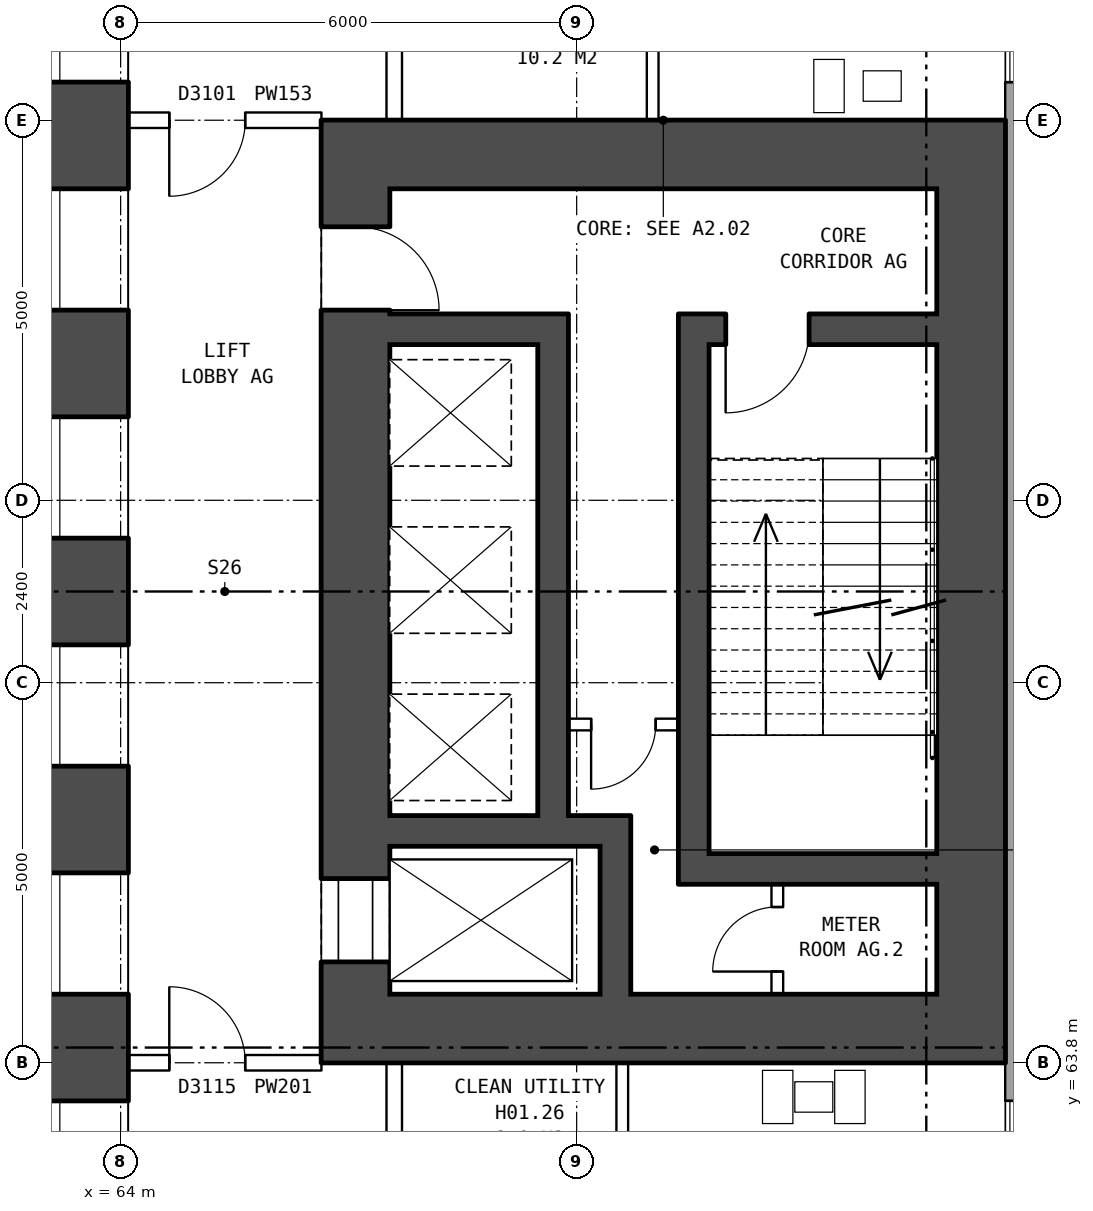
"""IFC4 building model, lengths in metres.
Left out: names, types, materials, properties, quantities, classifications, styles, units other than length and angle.
Written with IfcOpenShell. Run it as: python <this file> out.ifc"""

import sys

from ifc_helpers import new_model, si_unit, direction, frame, frame_2d, origin, place, context, subcontext, project, spatial, rectangle, extrude, element, fill, save


model = new_model("IFC4")
c1 = context("Model", 3, precision=1e-05, world=origin(), true_north=direction((0.0, 1.0)))
c2 = subcontext(c1, "Body", "Model", "MODEL_VIEW")
j1 = project(units=[si_unit("LENGTHUNIT", "METRE"), si_unit("PLANEANGLEUNIT", "RADIAN")], contexts=[c1])
p1 = place(None, origin())
s1 = spatial("IfcSite", under=j1, at=p1, CompositionType="ELEMENT")
p2 = place(p1, origin())
s2 = spatial("IfcBuilding", under=s1, at=p2, CompositionType="ELEMENT")
p3 = place(p2, frame((0.0, 0.0, 5.5)))
s3 = spatial("IfcBuildingStorey", under=s2, at=p3, CompositionType="ELEMENT", Elevation=5.5)
p4 = place(p3, frame((63.5, 56.4, -0.3), z_axis=(0.0, 0.0, 1.0), x_axis=(0.0, 1.0, 0.0)))
e1 = element("IfcWall", 1, at=p4, inside=s3, PredefinedType="SHEAR", context=c2, shape_type="SweptSolid", body=[
    extrude(rectangle(XDim=27.2, YDim=1.2, at=frame_2d((13.6, 0.0))), origin(), (0.0, 0.0, 1.0), 4.6),
])
p5 = place(p4, frame((2.3, 0.0, 0.8)))
e2 = element("IfcOpeningElement", 2, at=p5, cuts=e1, PredefinedType="OPENING", context=c2, shape_type="SweptSolid", body=[
    extrude(rectangle(XDim=1.6, YDim=1.8, at=frame_2d((0.8, 0.9))), frame((0.0, 0.61, 0.0), z_axis=(0.0, -1.0, 0.0), x_axis=(1.0, 0.0, 0.0)), (0.0, 0.0, 1.0), 1.22),
])
p6 = place(p4, frame((5.3, 0.0, 0.8)))
e3 = element("IfcOpeningElement", 3, at=p6, cuts=e1, PredefinedType="OPENING", context=c2, shape_type="SweptSolid", body=[
    extrude(rectangle(XDim=1.6, YDim=1.8, at=frame_2d((0.8, 0.9))), frame((0.0, 0.61, 0.0), z_axis=(0.0, -1.0, 0.0), x_axis=(1.0, 0.0, 0.0)), (0.0, 0.0, 1.0), 1.22),
])
p7 = place(p4, frame((8.3, 0.0, 0.8)))
e4 = element("IfcOpeningElement", 4, at=p7, cuts=e1, PredefinedType="OPENING", context=c2, shape_type="SweptSolid", body=[
    extrude(rectangle(XDim=1.6, YDim=1.8, at=frame_2d((0.8, 0.9))), frame((0.0, 0.61, 0.0), z_axis=(0.0, -1.0, 0.0), x_axis=(1.0, 0.0, 0.0)), (0.0, 0.0, 1.0), 1.22),
])
p8 = place(p4, frame((11.3, 0.0, 0.8)))
e5 = element("IfcOpeningElement", 5, at=p8, cuts=e1, PredefinedType="OPENING", context=c2, shape_type="SweptSolid", body=[
    extrude(rectangle(XDim=1.6, YDim=1.8, at=frame_2d((0.8, 0.9))), frame((0.0, 0.61, 0.0), z_axis=(0.0, -1.0, 0.0), x_axis=(1.0, 0.0, 0.0)), (0.0, 0.0, 1.0), 1.22),
])
p9 = place(p4, frame((14.3, 0.0, 0.8)))
e6 = element("IfcOpeningElement", 6, at=p9, cuts=e1, PredefinedType="OPENING", context=c2, shape_type="SweptSolid", body=[
    extrude(rectangle(XDim=1.6, YDim=1.8, at=frame_2d((0.8, 0.9))), frame((0.0, 0.61, 0.0), z_axis=(0.0, -1.0, 0.0), x_axis=(1.0, 0.0, 0.0)), (0.0, 0.0, 1.0), 1.22),
])
p10 = place(p4, frame((17.3, 0.0, 0.8)))
e7 = element("IfcOpeningElement", 7, at=p10, cuts=e1, PredefinedType="OPENING", context=c2, shape_type="SweptSolid", body=[
    extrude(rectangle(XDim=1.6, YDim=1.8, at=frame_2d((0.8, 0.9))), frame((0.0, 0.61, 0.0), z_axis=(0.0, -1.0, 0.0), x_axis=(1.0, 0.0, 0.0)), (0.0, 0.0, 1.0), 1.22),
])
p11 = place(p4, frame((20.3, 0.0, 0.8)))
e8 = element("IfcOpeningElement", 8, at=p11, cuts=e1, PredefinedType="OPENING", context=c2, shape_type="SweptSolid", body=[
    extrude(rectangle(XDim=1.6, YDim=1.8, at=frame_2d((0.8, 0.9))), frame((0.0, 0.61, 0.0), z_axis=(0.0, -1.0, 0.0), x_axis=(1.0, 0.0, 0.0)), (0.0, 0.0, 1.0), 1.22),
])
p12 = place(p4, frame((23.3, 0.0, 0.8)))
e9 = element("IfcOpeningElement", 9, at=p12, cuts=e1, PredefinedType="OPENING", context=c2, shape_type="SweptSolid", body=[
    extrude(rectangle(XDim=1.6, YDim=1.8, at=frame_2d((0.8, 0.9))), frame((0.0, 0.61, 0.0), z_axis=(0.0, -1.0, 0.0), x_axis=(1.0, 0.0, 0.0)), (0.0, 0.0, 1.0), 1.22),
])
p13 = place(p3, frame((75.82, 57.075, 0.0), z_axis=(0.0, 0.0, 1.0), x_axis=(0.0, 1.0, 0.0)))
e10 = element("IfcWall", 10, at=p13, inside=s3, PredefinedType="STANDARD", context=c2, shape_type="SweptSolid", body=[
    extrude(rectangle(XDim=25.851, YDim=0.36, at=frame_2d((12.925, 0.0))), origin(), (0.0, 0.0, 1.0), 4.3),
])
p14 = place(p13, frame((1.625, 0.0, 0.8)))
e11 = element("IfcOpeningElement", 11, at=p14, cuts=e10, PredefinedType="OPENING", context=c2, shape_type="SweptSolid", body=[
    extrude(rectangle(XDim=1.6, YDim=1.8, at=frame_2d((0.8, 0.9))), frame((0.0, 0.19, 0.0), z_axis=(0.0, -1.0, 0.0), x_axis=(1.0, 0.0, 0.0)), (0.0, 0.0, 1.0), 0.38),
])
p15 = place(p13, frame((4.625, 0.0, 0.8)))
e12 = element("IfcOpeningElement", 12, at=p15, cuts=e10, PredefinedType="OPENING", context=c2, shape_type="SweptSolid", body=[
    extrude(rectangle(XDim=1.6, YDim=1.8, at=frame_2d((0.8, 0.9))), frame((0.0, 0.19, 0.0), z_axis=(0.0, -1.0, 0.0), x_axis=(1.0, 0.0, 0.0)), (0.0, 0.0, 1.0), 0.38),
])
p16 = place(p13, frame((19.625, 0.0, 0.8)))
e13 = element("IfcOpeningElement", 13, at=p16, cuts=e10, PredefinedType="OPENING", context=c2, shape_type="SweptSolid", body=[
    extrude(rectangle(XDim=1.6, YDim=1.8, at=frame_2d((0.8, 0.9))), frame((0.0, 0.19, 0.0), z_axis=(0.0, -1.0, 0.0), x_axis=(1.0, 0.0, 0.0)), (0.0, 0.0, 1.0), 0.38),
])
p17 = place(p13, frame((22.625, 0.0, 0.8)))
e14 = element("IfcOpeningElement", 14, at=p17, cuts=e10, PredefinedType="OPENING", context=c2, shape_type="SweptSolid", body=[
    extrude(rectangle(XDim=1.6, YDim=1.8, at=frame_2d((0.8, 0.9))), frame((0.0, 0.19, 0.0), z_axis=(0.0, -1.0, 0.0), x_axis=(1.0, 0.0, 0.0)), (0.0, 0.0, 1.0), 0.38),
])
p18 = place(p3, frame((67.09, 64.7, 0.0), z_axis=(0.0, 0.0, 1.0), x_axis=(0.0, 1.0, 0.0)))
e15 = element("IfcWall", 15, at=p18, inside=s3, PredefinedType="SHEAR", context=c2, shape_type="SweptSolid", body=[
    extrude(rectangle(XDim=10.6, YDim=0.9, at=frame_2d((5.3, 0.0))), origin(), (0.0, 0.0, 1.0), 4.3),
])
p19 = place(p18, frame((0.425, 0.0, 0.0)))
e16 = element("IfcOpeningElement", 16, at=p19, cuts=e15, PredefinedType="OPENING", context=c2, shape_type="SweptSolid", body=[
    extrude(rectangle(XDim=1.1, YDim=2.1, at=frame_2d((0.55, 1.05))), frame((0.0, 0.46, 0.0), z_axis=(0.0, -1.0, 0.0), x_axis=(1.0, 0.0, 0.0)), (0.0, 0.0, 1.0), 0.92),
])
p20 = place(p18, frame((9.0, 0.0, 0.0)))
e17 = element("IfcOpeningElement", 17, at=p20, cuts=e15, PredefinedType="OPENING", context=c2, shape_type="SweptSolid", body=[
    extrude(rectangle(XDim=1.1, YDim=2.1, at=frame_2d((0.55, 1.05))), frame((0.0, 0.46, 0.0), z_axis=(0.0, -1.0, 0.0), x_axis=(1.0, 0.0, 0.0)), (0.0, 0.0, 1.0), 0.92),
])
p21 = place(p3, frame((75.19, 64.7, 0.0), z_axis=(0.0, 0.0, 1.0), x_axis=(0.0, 1.0, 0.0)))
e18 = element("IfcWall", 18, at=p21, inside=s3, PredefinedType="SHEAR", context=c2, shape_type="SweptSolid", body=[
    extrude(rectangle(XDim=10.6, YDim=0.9, at=frame_2d((5.3, 0.0))), origin(), (0.0, 0.0, 1.0), 4.3),
])
for number, where, z_axis, x_axis in (
    (19, (66.64, 64.25, 0.0), (0.0, 0.0, 1.0), (1.0, 0.0, 0.0)),
    (20, (66.64, 75.75, 0.0), (0.0, 0.0, 1.0), (1.0, 0.0, 0.0)),
):
    element("IfcWall", number, at=place(p3, frame(where, z_axis=z_axis, x_axis=x_axis)), inside=s3, PredefinedType="SHEAR", context=c2, shape_type="SweptSolid", body=[
        extrude(rectangle(XDim=9.0, YDim=0.9, at=frame_2d((4.5, 0.0))), origin(), (0.0, 0.0, 1.0), 4.3),
    ])
p22 = place(p3, frame((71.74, 66.35, 0.0), z_axis=(0.0, 0.0, 1.0), x_axis=(1.0, 0.0, 0.0)))
e21 = element("IfcWall", 21, at=p22, inside=s3, PredefinedType="SHEAR", context=c2, shape_type="SweptSolid", body=[
    extrude(rectangle(XDim=3.0, YDim=0.4, at=frame_2d((1.5, 0.0))), origin(), (0.0, 0.0, 1.0), 4.3),
])
p23 = place(p3, frame((67.54, 66.85, 0.0), z_axis=(0.0, 0.0, 1.0), x_axis=(1.0, 0.0, 0.0)))
e22 = element("IfcWall", 22, at=p23, inside=s3, PredefinedType="SHEAR", context=c2, shape_type="SweptSolid", body=[
    extrude(rectangle(XDim=3.17, YDim=0.4, at=frame_2d((1.585, 0.0))), origin(), (0.0, 0.0, 1.0), 4.3),
])
p24 = place(p3, frame((69.89, 68.25, 0.0), z_axis=(0.0, 0.0, 1.0), x_axis=(1.0, 0.0, 0.0)))
e23 = element("IfcWall", 23, at=p24, inside=s3, PredefinedType="PARTITIONING", context=c2, shape_type="SweptSolid", body=[
    extrude(rectangle(XDim=1.45, YDim=0.15, at=frame_2d((0.725, 0.0))), origin(), (0.0, 0.0, 1.0), 4.3),
])
p25 = place(p24, frame((0.3, 0.0, 0.0)))
e24 = element("IfcOpeningElement", 24, at=p25, cuts=e23, PredefinedType="OPENING", context=c2, shape_type="SweptSolid", body=[
    extrude(rectangle(XDim=0.85, YDim=2.1, at=frame_2d((0.425, 1.05))), frame((0.0, 0.085, 0.0), z_axis=(0.0, -1.0, 0.0), x_axis=(1.0, 0.0, 0.0)), (0.0, 0.0, 1.0), 0.17),
])
p26 = place(p3, frame((67.54, 73.45, 0.0), z_axis=(0.0, 0.0, 1.0), x_axis=(1.0, 0.0, 0.0)))
e25 = element("IfcWall", 25, at=p26, inside=s3, PredefinedType="SHEAR", context=c2, shape_type="SweptSolid", body=[
    extrude(rectangle(XDim=1.95, YDim=0.4, at=frame_2d((0.975, 0.0))), origin(), (0.0, 0.0, 1.0), 4.3),
])
p27 = place(p3, frame((71.74, 73.45, 0.0), z_axis=(0.0, 0.0, 1.0), x_axis=(1.0, 0.0, 0.0)))
e26 = element("IfcWall", 26, at=p27, inside=s3, PredefinedType="SHEAR", context=c2, shape_type="SweptSolid", body=[
    extrude(rectangle(XDim=3.0, YDim=0.4, at=frame_2d((1.5, 0.0))), origin(), (0.0, 0.0, 1.0), 4.3),
])
p28 = place(p27, frame((0.22, 0.0, 0.0)))
e27 = element("IfcOpeningElement", 27, at=p28, cuts=e26, PredefinedType="OPENING", context=c2, shape_type="SweptSolid", body=[
    extrude(rectangle(XDim=1.1, YDim=2.1, at=frame_2d((0.55, 1.05))), frame((0.0, 0.21, 0.0), z_axis=(0.0, -1.0, 0.0), x_axis=(1.0, 0.0, 0.0)), (0.0, 0.0, 1.0), 0.42),
])
p29 = place(p3, frame((69.69, 67.05, 0.0), z_axis=(0.0, 0.0, 1.0), x_axis=(0.0, 1.0, 0.0)))
e28 = element("IfcWall", 28, at=p29, inside=s3, PredefinedType="SHEAR", context=c2, shape_type="SweptSolid", body=[
    extrude(rectangle(XDim=6.6, YDim=0.4, at=frame_2d((3.3, 0.0))), origin(), (0.0, 0.0, 1.0), 4.3),
])
p30 = place(p3, frame((70.51, 64.7, 0.0), z_axis=(0.0, 0.0, 1.0), x_axis=(0.0, 1.0, 0.0)))
e29 = element("IfcWall", 29, at=p30, inside=s3, PredefinedType="SHEAR", context=c2, shape_type="SweptSolid", body=[
    extrude(rectangle(XDim=1.95, YDim=0.4, at=frame_2d((0.975, 0.0))), origin(), (0.0, 0.0, 1.0), 4.3),
])
p31 = place(p3, frame((71.54, 66.15, 0.0), z_axis=(0.0, 0.0, 1.0), x_axis=(0.0, 1.0, 0.0)))
e30 = element("IfcWall", 30, at=p31, inside=s3, PredefinedType="SHEAR", context=c2, shape_type="SweptSolid", body=[
    extrude(rectangle(XDim=7.5, YDim=0.4, at=frame_2d((3.75, 0.0))), origin(), (0.0, 0.0, 1.0), 4.3),
])
p32 = place(p3, frame((72.64, 64.7, 0.0), z_axis=(0.0, 0.0, 1.0), x_axis=(0.0, 1.0, 0.0)))
e31 = element("IfcWall", 31, at=p32, inside=s3, PredefinedType="PARTITIONING", context=c2, shape_type="SweptSolid", body=[
    extrude(rectangle(XDim=1.45, YDim=0.15, at=frame_2d((0.725, 0.0))), origin(), (0.0, 0.0, 1.0), 4.3),
])
p33 = place(p32, frame((0.3, 0.0, 0.0)))
e32 = element("IfcOpeningElement", 32, at=p33, cuts=e31, PredefinedType="OPENING", context=c2, shape_type="SweptSolid", body=[
    extrude(rectangle(XDim=0.85, YDim=2.1, at=frame_2d((0.425, 1.05))), frame((0.0, 0.085, 0.0), z_axis=(0.0, -1.0, 0.0), x_axis=(1.0, 0.0, 0.0)), (0.0, 0.0, 1.0), 0.17),
])
p34 = place(p3, frame((64.1, 63.8, 0.0), z_axis=(0.0, 0.0, 1.0), x_axis=(1.0, 0.0, 0.0)))
e33 = element("IfcWall", 33, at=p34, inside=s3, PredefinedType="PARTITIONING", context=c2, shape_type="SweptSolid", body=[
    extrude(rectangle(XDim=2.54, YDim=0.2, at=frame_2d((1.27, 0.0))), origin(), (0.0, 0.0, 1.0), 4.3),
])
p35 = place(p34, frame((0.54, 0.0, 0.0)))
e34 = element("IfcOpeningElement", 34, at=p35, cuts=e33, PredefinedType="OPENING", context=c2, shape_type="SweptSolid", body=[
    extrude(rectangle(XDim=1.0, YDim=2.1, at=frame_2d((0.5, 1.05))), frame((0.0, 0.11, 0.0), z_axis=(0.0, -1.0, 0.0), x_axis=(1.0, 0.0, 0.0)), (0.0, 0.0, 1.0), 0.22),
])
p36 = place(p3, frame((64.1, 76.2, 0.0), z_axis=(0.0, 0.0, 1.0), x_axis=(1.0, 0.0, 0.0)))
e35 = element("IfcWall", 35, at=p36, inside=s3, PredefinedType="PARTITIONING", context=c2, shape_type="SweptSolid", body=[
    extrude(rectangle(XDim=2.54, YDim=0.2, at=frame_2d((1.27, 0.0))), origin(), (0.0, 0.0, 1.0), 4.3),
])
p37 = place(p36, frame((0.54, 0.0, 0.0)))
e36 = element("IfcOpeningElement", 36, at=p37, cuts=e35, PredefinedType="OPENING", context=c2, shape_type="SweptSolid", body=[
    extrude(rectangle(XDim=1.0, YDim=2.1, at=frame_2d((0.5, 1.05))), frame((0.0, 0.11, 0.0), z_axis=(0.0, -1.0, 0.0), x_axis=(1.0, 0.0, 0.0)), (0.0, 0.0, 1.0), 0.22),
])
p38 = place(p3, frame((67.6, 60.7, 0.0), z_axis=(0.0, 0.0, 1.0), x_axis=(0.0, 1.0, 0.0)))
e37 = element("IfcWall", 37, at=p38, inside=s3, PredefinedType="PARTITIONING", context=c2, shape_type="SweptSolid", body=[
    extrude(rectangle(XDim=3.1, YDim=0.2, at=frame_2d((1.55, 0.0))), origin(), (0.0, 0.0, 1.0), 4.3),
])
p39 = place(p38, frame((1.1, 0.0, 0.0)))
e38 = element("IfcOpeningElement", 38, at=p39, cuts=e37, PredefinedType="OPENING", context=c2, shape_type="SweptSolid", body=[
    extrude(rectangle(XDim=1.0, YDim=2.1, at=frame_2d((0.5, 1.05))), frame((0.0, 0.11, 0.0), z_axis=(0.0, -1.0, 0.0), x_axis=(1.0, 0.0, 0.0)), (0.0, 0.0, 1.0), 0.22),
])
p40 = place(p3, frame((67.6, 76.2, 0.0), z_axis=(0.0, 0.0, 1.0), x_axis=(0.0, 1.0, 0.0)))
e39 = element("IfcWall", 39, at=p40, inside=s3, PredefinedType="PARTITIONING", context=c2, shape_type="SweptSolid", body=[
    extrude(rectangle(XDim=3.1, YDim=0.2, at=frame_2d((1.55, 0.0))), origin(), (0.0, 0.0, 1.0), 4.3),
])
for number, where, z_axis, x_axis in (
    (40, (70.6, 60.7, 0.0), (0.0, 0.0, 1.0), (0.0, 1.0, 0.0)),
    (41, (71.0, 76.2, 0.0), (0.0, 0.0, 1.0), (0.0, 1.0, 0.0)),
):
    element("IfcWall", number, at=place(p3, frame(where, z_axis=z_axis, x_axis=x_axis)), inside=s3, PredefinedType="PLUMBINGWALL", context=c2, shape_type="SweptSolid", body=[
        extrude(rectangle(XDim=3.1, YDim=0.15, at=frame_2d((1.55, 0.0))), origin(), (0.0, 0.0, 1.0), 4.3),
    ])
p41 = place(p15, origin())
e42 = element("IfcWindow", 42, at=p41, inside=s3, PartitioningType="SINGLE_PANEL", PredefinedType="WINDOW", context=c2, shape_type="SweptSolid", body=[
    extrude(rectangle(XDim=1.6, YDim=1.8, at=frame_2d((0.8, 0.9))), frame((0.0, 0.15, 0.0), z_axis=(0.0, -1.0, 0.0), x_axis=(1.0, 0.0, 0.0)), (0.0, 0.0, 1.0), 0.06),
])
fill(e12, e42)
p42 = place(p16, origin())
e43 = element("IfcWindow", 43, at=p42, inside=s3, PartitioningType="SINGLE_PANEL", PredefinedType="WINDOW", context=c2, shape_type="SweptSolid", body=[
    extrude(rectangle(XDim=1.6, YDim=1.8, at=frame_2d((0.8, 0.9))), frame((0.0, 0.15, 0.0), z_axis=(0.0, -1.0, 0.0), x_axis=(1.0, 0.0, 0.0)), (0.0, 0.0, 1.0), 0.06),
])
fill(e13, e43)
p43 = place(p6, origin())
e44 = element("IfcWindow", 44, at=p43, inside=s3, PartitioningType="SINGLE_PANEL", PredefinedType="WINDOW", context=c2, shape_type="SweptSolid", body=[
    extrude(rectangle(XDim=1.6, YDim=1.8, at=frame_2d((0.8, 0.9))), frame((0.0, 0.33, 0.0), z_axis=(0.0, -1.0, 0.0), x_axis=(1.0, 0.0, 0.0)), (0.0, 0.0, 1.0), 0.06),
])
fill(e3, e44)
p44 = place(p7, origin())
e45 = element("IfcWindow", 45, at=p44, inside=s3, PartitioningType="SINGLE_PANEL", PredefinedType="WINDOW", context=c2, shape_type="SweptSolid", body=[
    extrude(rectangle(XDim=1.6, YDim=1.8, at=frame_2d((0.8, 0.9))), frame((0.0, 0.33, 0.0), z_axis=(0.0, -1.0, 0.0), x_axis=(1.0, 0.0, 0.0)), (0.0, 0.0, 1.0), 0.06),
])
fill(e4, e45)
p45 = place(p8, origin())
e46 = element("IfcWindow", 46, at=p45, inside=s3, PartitioningType="SINGLE_PANEL", PredefinedType="WINDOW", context=c2, shape_type="SweptSolid", body=[
    extrude(rectangle(XDim=1.6, YDim=1.8, at=frame_2d((0.8, 0.9))), frame((0.0, 0.33, 0.0), z_axis=(0.0, -1.0, 0.0), x_axis=(1.0, 0.0, 0.0)), (0.0, 0.0, 1.0), 0.06),
])
fill(e5, e46)
p46 = place(p9, origin())
e47 = element("IfcWindow", 47, at=p46, inside=s3, PartitioningType="SINGLE_PANEL", PredefinedType="WINDOW", context=c2, shape_type="SweptSolid", body=[
    extrude(rectangle(XDim=1.6, YDim=1.8, at=frame_2d((0.8, 0.9))), frame((0.0, 0.33, 0.0), z_axis=(0.0, -1.0, 0.0), x_axis=(1.0, 0.0, 0.0)), (0.0, 0.0, 1.0), 0.06),
])
fill(e6, e47)
p47 = place(p10, origin())
e48 = element("IfcWindow", 48, at=p47, inside=s3, PartitioningType="SINGLE_PANEL", PredefinedType="WINDOW", context=c2, shape_type="SweptSolid", body=[
    extrude(rectangle(XDim=1.6, YDim=1.8, at=frame_2d((0.8, 0.9))), frame((0.0, 0.33, 0.0), z_axis=(0.0, -1.0, 0.0), x_axis=(1.0, 0.0, 0.0)), (0.0, 0.0, 1.0), 0.06),
])
fill(e7, e48)
p48 = place(p11, origin())
e49 = element("IfcWindow", 49, at=p48, inside=s3, PartitioningType="SINGLE_PANEL", PredefinedType="WINDOW", context=c2, shape_type="SweptSolid", body=[
    extrude(rectangle(XDim=1.6, YDim=1.8, at=frame_2d((0.8, 0.9))), frame((0.0, 0.33, 0.0), z_axis=(0.0, -1.0, 0.0), x_axis=(1.0, 0.0, 0.0)), (0.0, 0.0, 1.0), 0.06),
])
fill(e8, e49)
p49 = place(p19, origin())
e50 = element("IfcDoor", 50, at=p49, inside=s3, OperationType="DOUBLE_DOOR_SLIDING", PredefinedType="DOOR", context=c2, shape_type="SweptSolid", body=[
    extrude(rectangle(XDim=1.1, YDim=2.1, at=frame_2d((0.55, 1.05))), frame((0.0, -0.385, 0.0), z_axis=(0.0, -1.0, 0.0), x_axis=(1.0, 0.0, 0.0)), (0.0, 0.0, 1.0), 0.05),
])
fill(e16, e50)
p50 = place(p20, frame((1.1, 0.0, 0.0), z_axis=(0.0, 0.0, 1.0), x_axis=(-1.0, 0.0, 0.0)))
e51 = element("IfcDoor", 51, at=p50, inside=s3, OperationType="SINGLE_SWING_RIGHT", PredefinedType="DOOR", context=c2, shape_type="SweptSolid", body=[
    extrude(rectangle(XDim=1.1, YDim=2.1, at=frame_2d((0.55, 1.05))), frame((0.0, 0.435, 0.0), z_axis=(0.0, -1.0, 0.0), x_axis=(1.0, 0.0, 0.0)), (0.0, 0.0, 1.0), 0.05),
])
fill(e17, e51)
p51 = place(p28, frame((1.1, 0.0, 0.0), z_axis=(0.0, 0.0, 1.0), x_axis=(-1.0, 0.0, 0.0)))
e52 = element("IfcDoor", 52, at=p51, inside=s3, OperationType="SINGLE_SWING_RIGHT", PredefinedType="DOOR", context=c2, shape_type="SweptSolid", body=[
    extrude(rectangle(XDim=1.1, YDim=2.1, at=frame_2d((0.55, 1.05))), frame((0.0, 0.025, 0.0), z_axis=(0.0, -1.0, 0.0), x_axis=(1.0, 0.0, 0.0)), (0.0, 0.0, 1.0), 0.05),
])
fill(e27, e52)
p52 = place(p25, frame((0.85, 0.0, 0.0), z_axis=(0.0, 0.0, 1.0), x_axis=(-1.0, 0.0, 0.0)))
e53 = element("IfcDoor", 53, at=p52, inside=s3, OperationType="SINGLE_SWING_RIGHT", PredefinedType="DOOR", context=c2, shape_type="SweptSolid", body=[
    extrude(rectangle(XDim=0.85, YDim=2.1, at=frame_2d((0.425, 1.05))), frame((0.0, 0.025, 0.0), z_axis=(0.0, -1.0, 0.0), x_axis=(1.0, 0.0, 0.0)), (0.0, 0.0, 1.0), 0.05),
])
fill(e24, e53)
p53 = place(p33, origin())
e54 = element("IfcDoor", 54, at=p53, inside=s3, OperationType="SINGLE_SWING_LEFT", PredefinedType="DOOR", context=c2, shape_type="SweptSolid", body=[
    extrude(rectangle(XDim=0.85, YDim=2.1, at=frame_2d((0.425, 1.05))), frame((0.0, 0.025, 0.0), z_axis=(0.0, -1.0, 0.0), x_axis=(1.0, 0.0, 0.0)), (0.0, 0.0, 1.0), 0.05),
])
fill(e32, e54)
p54 = place(p35, origin())
e55 = element("IfcDoor", 55, at=p54, inside=s3, OperationType="SINGLE_SWING_LEFT", PredefinedType="DOOR", context=c2, shape_type="SweptSolid", body=[
    extrude(rectangle(XDim=1.0, YDim=2.1, at=frame_2d((0.5, 1.05))), frame((0.0, 0.025, 0.0), z_axis=(0.0, -1.0, 0.0), x_axis=(1.0, 0.0, 0.0)), (0.0, 0.0, 1.0), 0.05),
])
fill(e34, e55)
p55 = place(p37, frame((1.0, 0.0, 0.0), z_axis=(0.0, 0.0, 1.0), x_axis=(-1.0, 0.0, 0.0)))
e56 = element("IfcDoor", 56, at=p55, inside=s3, OperationType="SINGLE_SWING_RIGHT", PredefinedType="DOOR", context=c2, shape_type="SweptSolid", body=[
    extrude(rectangle(XDim=1.0, YDim=2.1, at=frame_2d((0.5, 1.05))), frame((0.0, 0.025, 0.0), z_axis=(0.0, -1.0, 0.0), x_axis=(1.0, 0.0, 0.0)), (0.0, 0.0, 1.0), 0.05),
])
fill(e36, e56)
save(model, sys.argv[1])
